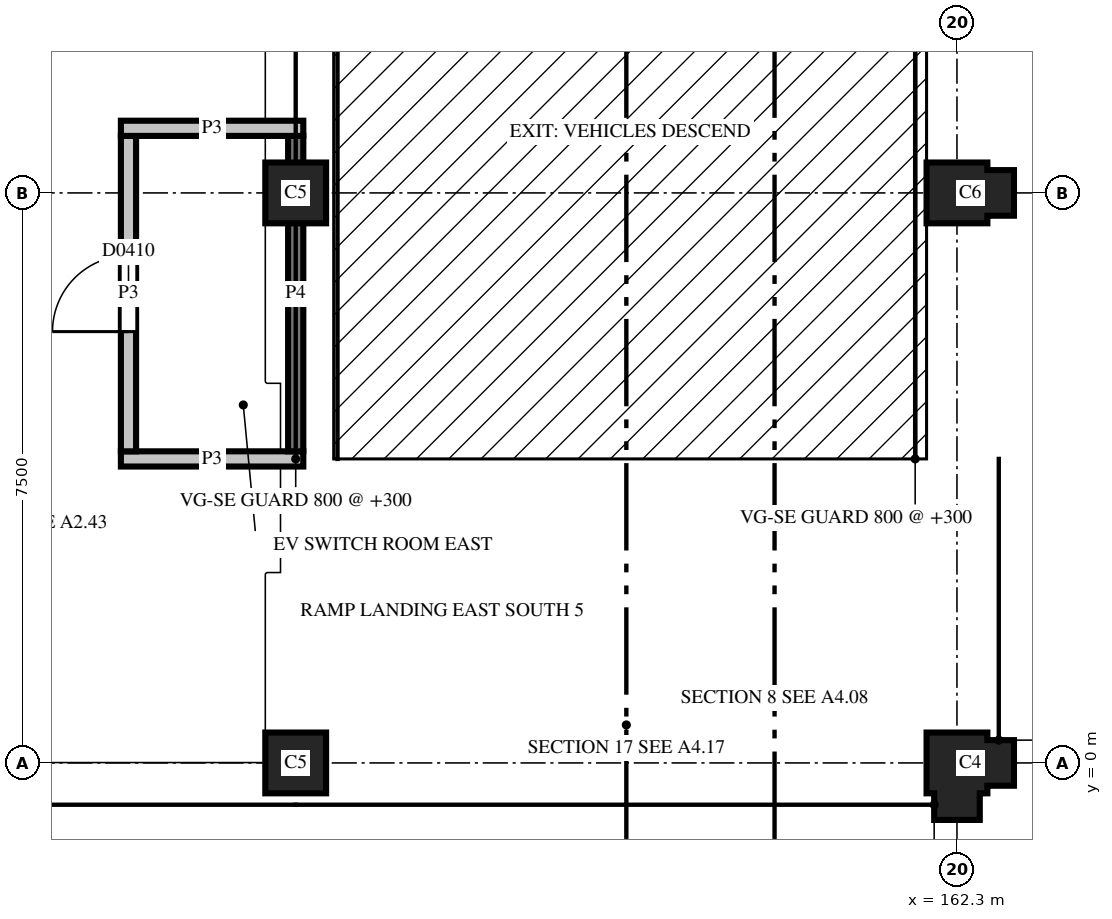
"""IFC4 building model, lengths in metres.
Left out: names, types, materials, properties, quantities, classifications, styles, units other than length and angle.
Written with IfcOpenShell. Run it as: python <this file> out.ifc"""

import sys

from ifc_helpers import new_model, si_unit, direction, frame, frame_2d, origin, place, context, subcontext, project, spatial, polyline, rectangle, outline, extrude, element, fill, save


model = new_model("IFC4")
c1 = context("Model", 3, precision=1e-05, world=origin(), true_north=direction((0.0, 1.0)))
c2 = subcontext(c1, "Body", "Model", "MODEL_VIEW")
j1 = project(units=[si_unit("LENGTHUNIT", "METRE"), si_unit("PLANEANGLEUNIT", "RADIAN")], contexts=[c1])
p1 = place(None, origin())
s1 = spatial("IfcSite", under=j1, at=p1, CompositionType="ELEMENT")
p2 = place(p1, origin())
s2 = spatial("IfcBuilding", under=s1, at=p2, CompositionType="ELEMENT")
p3 = place(p2, frame((0.0, 0.0, 15.6)))
s3 = spatial("IfcBuildingStorey", under=s2, at=p3, CompositionType="ELEMENT", Elevation=15.6)
p4 = place(p3, frame((153.6, 0.0, 0.0), z_axis=(0.0, 0.0, 1.0), x_axis=(1.0, 0.0, 0.0)))
e1 = element("IfcColumn", 1, at=p4, inside=s3, PredefinedType="COLUMN", context=c2, shape_type="SweptSolid", body=[
    extrude(outline(polyline([(-0.4, -0.4), (0.4, -0.4), (0.4, 0.4), (-0.4, 0.4), (-0.4, -0.4)])), origin(), (0.0, 0.0, 1.0), 3.7),
])
p5 = place(p3, frame((162.3, 0.0, 0.0), z_axis=(0.0, 0.0, 1.0), x_axis=(0.0, -1.0, 0.0)))
e2 = element("IfcColumn", 2, at=p5, inside=s3, PredefinedType="COLUMN", context=c2, shape_type="SweptSolid", body=[
    extrude(outline(polyline([(-0.4, -0.4), (0.4, -0.4), (0.4, -0.3), (0.75, -0.3), (0.75, 0.3), (0.4, 0.3), (0.4, 0.4), (0.3, 0.4), (0.3, 0.75), (-0.3, 0.75), (-0.3, 0.4), (-0.4, 0.4), (-0.4, -0.4)])), origin(), (0.0, 0.0, 1.0), 3.7),
])
p6 = place(p3, frame((153.6, 7.5, 0.0), z_axis=(0.0, 0.0, 1.0), x_axis=(1.0, 0.0, 0.0)))
e3 = element("IfcColumn", 3, at=p6, inside=s3, PredefinedType="COLUMN", context=c2, shape_type="SweptSolid", body=[
    extrude(outline(polyline([(-0.4, -0.4), (0.4, -0.4), (0.4, 0.4), (-0.4, 0.4), (-0.4, -0.4)])), origin(), (0.0, 0.0, 1.0), 3.7),
])
p7 = place(p3, frame((162.3, 7.5, 0.0), z_axis=(0.0, 0.0, 1.0), x_axis=(1.0, 0.0, 0.0)))
e4 = element("IfcColumn", 4, at=p7, inside=s3, PredefinedType="COLUMN", context=c2, shape_type="SweptSolid", body=[
    extrude(outline(polyline([(-0.4, -0.4), (0.4, -0.4), (0.4, -0.3), (0.75, -0.3), (0.75, 0.3), (0.4, 0.3), (0.4, 0.4), (-0.4, 0.4), (-0.4, -0.4)])), origin(), (0.0, 0.0, 1.0), 3.7),
])
p8 = place(p3, frame((151.3, 4.0, 0.0), z_axis=(0.0, 0.0, 1.0), x_axis=(1.0, 0.0, 0.0)))
e5 = element("IfcWall", 5, at=p8, inside=s3, PredefinedType="PARTITIONING", context=c2, shape_type="SweptSolid", body=[
    extrude(rectangle(XDim=2.4, YDim=0.2, at=frame_2d((1.2, 0.0))), origin(), (0.0, 0.0, 1.0), 2.88),
])
p9 = place(p3, frame((153.6, 4.1, 0.0), z_axis=(0.0, 0.0, 1.0), x_axis=(0.0, 1.0, 0.0)))
e6 = element("IfcWall", 6, at=p9, inside=s3, PredefinedType="PARTITIONING", context=c2, shape_type="SweptSolid", body=[
    extrude(rectangle(XDim=4.15, YDim=0.2, at=frame_2d((2.075, 0.0))), origin(), (0.0, 0.0, 1.0), 2.6),
])
p10 = place(p3, frame((151.4, 8.25, 0.0), z_axis=(0.0, 0.0, 1.0), x_axis=(0.0, -1.0, 0.0)))
e7 = element("IfcWall", 7, at=p10, inside=s3, PredefinedType="PARTITIONING", context=c2, shape_type="SweptSolid", body=[
    extrude(rectangle(XDim=4.15, YDim=0.2, at=frame_2d((2.075, 0.0))), origin(), (0.0, 0.0, 1.0), 2.88),
])
p11 = place(p10, frame((1.575, 0.0, 0.0)))
e8 = element("IfcOpeningElement", 8, at=p11, cuts=e7, PredefinedType="OPENING", context=c2, shape_type="SweptSolid", body=[
    extrude(rectangle(XDim=1.0, YDim=2.1, at=frame_2d((0.5, 1.05))), frame((0.0, 0.11, 0.0), z_axis=(0.0, -1.0, 0.0), x_axis=(1.0, 0.0, 0.0)), (0.0, 0.0, 1.0), 0.22),
])
p12 = place(p3, frame((153.7, 8.35, 0.0), z_axis=(0.0, 0.0, 1.0), x_axis=(-1.0, 0.0, 0.0)))
e9 = element("IfcWall", 9, at=p12, inside=s3, PredefinedType="PARTITIONING", context=c2, shape_type="SweptSolid", body=[
    extrude(rectangle(XDim=2.4, YDim=0.2, at=frame_2d((1.2, 0.0))), origin(), (0.0, 0.0, 1.0), 2.88),
])
p13 = place(p11, origin())
e10 = element("IfcDoor", 10, at=p13, inside=s3, OperationType="SINGLE_SWING_RIGHT", PredefinedType="DOOR", context=c2, shape_type="SweptSolid", body=[
    extrude(rectangle(XDim=1.0, YDim=2.1, at=frame_2d((0.5, 1.05))), frame((0.0, 0.025, 0.0), z_axis=(0.0, -1.0, 0.0), x_axis=(1.0, 0.0, 0.0)), (0.0, 0.0, 1.0), 0.05),
])
fill(e8, e10)
save(model, sys.argv[1])
